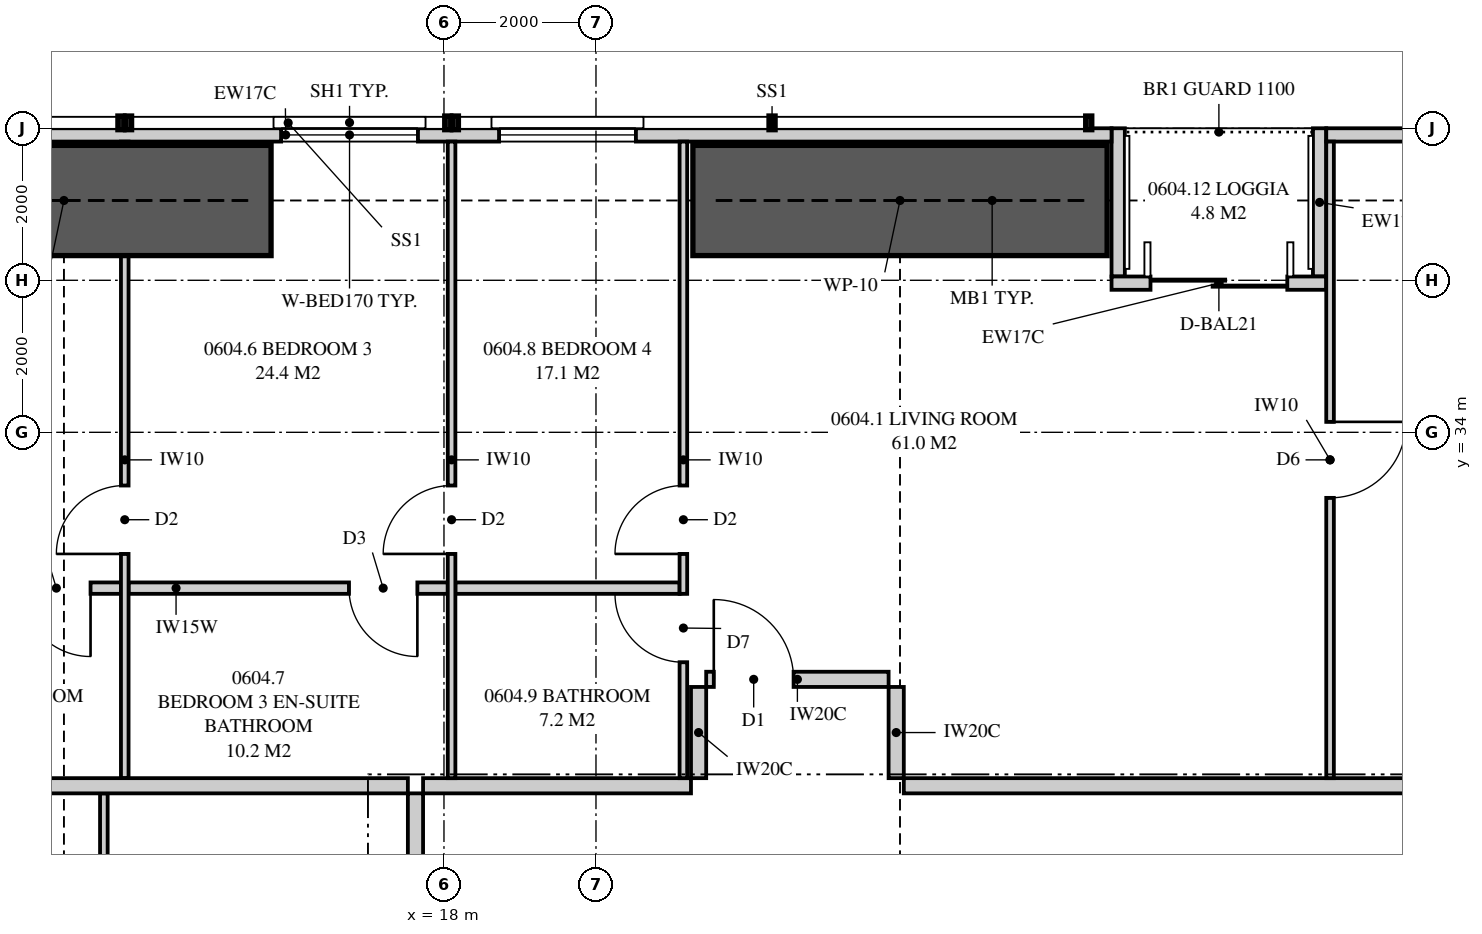
"""IFC4 building model, lengths in metres.
Left out: names, types, materials, properties, quantities, classifications, styles, units other than length and angle.
Written with IfcOpenShell. Run it as: python <this file> out.ifc"""

import sys

from ifc_helpers import new_model, si_unit, direction, frame, frame_2d, origin, place, context, subcontext, project, spatial, polyline, rectangle, outline, extrude, element, fill, save


model = new_model("IFC4")
c1 = context("Model", 3, precision=1e-05, world=origin(), true_north=direction((0.0, 1.0)))
c2 = subcontext(c1, "Body", "Model", "MODEL_VIEW")
j1 = project(units=[si_unit("LENGTHUNIT", "METRE"), si_unit("PLANEANGLEUNIT", "RADIAN")], contexts=[c1])
p1 = place(None, origin())
s1 = spatial("IfcSite", under=j1, at=p1, CompositionType="ELEMENT")
p2 = place(p1, origin())
s2 = spatial("IfcBuilding", under=s1, at=p2, CompositionType="ELEMENT")
p3 = place(p2, frame((0.0, 0.0, 27.7)))
s3 = spatial("IfcBuildingStorey", under=s2, at=p3, CompositionType="ELEMENT", Elevation=27.7)
p4 = place(p3, frame((38.174, 37.913, 0.0), z_axis=(0.0, 0.0, 1.0), x_axis=(-1.0, 0.0, 0.0)))
e1 = element("IfcWall", 1, at=p4, inside=s3, PredefinedType="SOLIDWALL", context=c2, shape_type="SweptSolid", body=[
    extrude(outline(polyline([(0.0, 0.0), (8.565, 0.0), (8.565, 2.15), (3.174, 2.15), (3.174, 3.11), (3.018, 3.11), (3.018, 2.15), (2.97, 2.15), (2.97, 3.11), (0.0, 3.11), (0.0, 0.0)])), frame((0.0, 0.087, 0.0), z_axis=(0.0, -1.0, 0.0), x_axis=(1.0, 0.0, 0.0)), (0.0, 0.0, 1.0), 0.175),
])
p5 = place(p4, frame((6.092, 0.0, 0.4)))
e2 = element("IfcOpeningElement", 2, at=p5, cuts=e1, PredefinedType="OPENING", context=c2, shape_type="SweptSolid", body=[
    extrude(rectangle(XDim=1.2, YDim=1.7, at=frame_2d((0.6, 0.85))), frame((0.0, 0.097, 0.0), z_axis=(0.0, -1.0, 0.0), x_axis=(1.0, 0.0, 0.0)), (0.0, 0.0, 1.0), 0.195),
])
p6 = place(p3, frame((26.783, 37.913, 0.0), z_axis=(0.0, 0.0, 1.0), x_axis=(-1.0, 0.0, 0.0)))
e3 = element("IfcWall", 3, at=p6, inside=s3, PredefinedType="SOLIDWALL", context=c2, shape_type="SweptSolid", body=[
    extrude(outline(polyline([(0.0, 0.0), (21.732, 0.0), (21.732, 3.11), (13.987, 3.11), (13.987, 2.15), (13.939, 2.15), (13.939, 3.11), (13.783, 3.11), (13.783, 2.15), (0.0, 2.15), (0.0, 0.0)])), frame((0.0, 0.087, 0.0), z_axis=(0.0, -1.0, 0.0), x_axis=(1.0, 0.0, 0.0)), (0.0, 0.0, 1.0), 0.175),
])
p7 = place(p6, frame((6.258, 0.0, 0.4)))
e4 = element("IfcOpeningElement", 4, at=p7, cuts=e3, PredefinedType="OPENING", context=c2, shape_type="SweptSolid", body=[
    extrude(rectangle(XDim=1.8, YDim=1.7, at=frame_2d((0.9, 0.85))), frame((0.0, 0.097, 0.0), z_axis=(0.0, -1.0, 0.0), x_axis=(1.0, 0.0, 0.0)), (0.0, 0.0, 1.0), 0.195),
])
p8 = place(p6, frame((9.126, 0.0, 0.4)))
e5 = element("IfcOpeningElement", 5, at=p8, cuts=e3, PredefinedType="OPENING", context=c2, shape_type="SweptSolid", body=[
    extrude(rectangle(XDim=1.8, YDim=1.7, at=frame_2d((0.9, 0.85))), frame((0.0, 0.097, 0.0), z_axis=(0.0, -1.0, 0.0), x_axis=(1.0, 0.0, 0.0)), (0.0, 0.0, 1.0), 0.195),
])
p9 = place(p6, frame((16.613, 0.0, 0.4)))
e6 = element("IfcOpeningElement", 6, at=p9, cuts=e3, PredefinedType="OPENING", context=c2, shape_type="SweptSolid", body=[
    extrude(rectangle(XDim=1.8, YDim=1.7, at=frame_2d((0.9, 0.85))), frame((0.0, 0.097, 0.0), z_axis=(0.0, -1.0, 0.0), x_axis=(1.0, 0.0, 0.0)), (0.0, 0.0, 1.0), 0.195),
])
p10 = place(p3, frame((29.608, 35.962, 0.0), z_axis=(0.0, 0.0, 1.0), x_axis=(-1.0, 0.0, 0.0)))
e7 = element("IfcWall", 7, at=p10, inside=s3, PredefinedType="SOLIDWALL", context=c2, shape_type="SweptSolid", body=[
    extrude(rectangle(XDim=2.825, YDim=0.175, at=frame_2d((1.413, 0.0))), origin(), (0.0, 0.0, 1.0), 3.11),
])
p11 = place(p10, frame((0.512, 0.0, 0.0)))
e8 = element("IfcOpeningElement", 8, at=p11, cuts=e7, PredefinedType="OPENING", context=c2, shape_type="SweptSolid", body=[
    extrude(rectangle(XDim=1.8, YDim=2.1, at=frame_2d((0.9, 1.05))), frame((0.0, 0.097, 0.0), z_axis=(0.0, -1.0, 0.0), x_axis=(1.0, 0.0, 0.0)), (0.0, 0.0, 1.0), 0.195),
])
for number, where, z_axis, x_axis in (
    (9, (29.521, 38.0, 0.0), (0.0, 0.0, 1.0), (0.0, -1.0, 0.0)),
    (10, (26.871, 38.0, 0.0), (0.0, 0.0, 1.0), (0.0, -1.0, 0.0)),
):
    element("IfcWall", number, at=place(p3, frame(where, z_axis=z_axis, x_axis=x_axis)), inside=s3, PredefinedType="SOLIDWALL", context=c2, shape_type="SweptSolid", body=[
        extrude(outline(polyline([(0.0, 0.0), (1.95, 0.0), (1.95, 3.11), (1.75, 3.11), (1.75, 2.15), (0.15, 2.15), (0.15, 3.11), (0.0, 3.11), (0.0, 0.0)])), frame((0.0, 0.087, 0.0), z_axis=(0.0, -1.0, 0.0), x_axis=(1.0, 0.0, 0.0)), (0.0, 0.0, 1.0), 0.175),
    ])
p12 = place(p3, frame((17.725, 29.35, 0.0), z_axis=(0.0, 0.0, 1.0), x_axis=(1.0, 0.0, 0.0)))
e11 = element("IfcWall", 11, at=p12, inside=s3, PredefinedType="PARTITIONING", context=c2, shape_type="SweptSolid", body=[
    extrude(rectangle(XDim=3.525, YDim=0.2, at=frame_2d((1.762, 0.0))), origin(), (0.0, 0.0, 1.0), 3.11),
])
p13 = place(p3, frame((13.8, 37.825, 0.0), z_axis=(0.0, 0.0, 1.0), x_axis=(0.0, -1.0, 0.0)))
e12 = element("IfcWall", 12, at=p13, inside=s3, PredefinedType="PARTITIONING", context=c2, shape_type="SweptSolid", body=[
    extrude(outline(polyline([(1.635, 2.15), (0.0, 2.15), (0.0, 0.0), (8.375, 0.0), (8.375, 3.11), (1.635, 3.11), (1.635, 2.15)]), holes=[polyline([(1.021, 0.126), (0.529, 0.126), (0.529, 0.919), (1.021, 0.919), (1.021, 0.126)]), polyline([(1.021, 1.231), (0.529, 1.231), (0.529, 2.024), (1.021, 2.024), (1.021, 1.231)])]), frame((0.0, 0.05, 0.0), z_axis=(0.0, -1.0, 0.0), x_axis=(1.0, 0.0, 0.0)), (0.0, 0.0, 1.0), 0.1),
])
p14 = place(p13, frame((4.525, 0.0, 0.0)))
e13 = element("IfcOpeningElement", 13, at=p14, cuts=e12, PredefinedType="OPENING", context=c2, shape_type="SweptSolid", body=[
    extrude(rectangle(XDim=0.9, YDim=2.1, at=frame_2d((0.45, 1.05))), frame((0.0, 0.06, 0.0), z_axis=(0.0, -1.0, 0.0), x_axis=(1.0, 0.0, 0.0)), (0.0, 0.0, 1.0), 0.12),
])
p15 = place(p3, frame((18.1, 37.825, 0.0), z_axis=(0.0, 0.0, 1.0), x_axis=(0.0, -1.0, 0.0)))
e14 = element("IfcWall", 14, at=p15, inside=s3, PredefinedType="PARTITIONING", context=c2, shape_type="SweptSolid", body=[
    extrude(outline(polyline([(0.0, 0.0), (8.375, 0.0), (8.375, 3.11), (1.635, 3.11), (1.635, 2.15), (0.0, 2.15), (0.0, 3.11), (0.0, 0.0)])), frame((0.0, 0.05, 0.0), z_axis=(0.0, -1.0, 0.0), x_axis=(1.0, 0.0, 0.0)), (0.0, 0.0, 1.0), 0.1),
])
p16 = place(p15, frame((4.525, 0.0, 0.0)))
e15 = element("IfcOpeningElement", 15, at=p16, cuts=e14, PredefinedType="OPENING", context=c2, shape_type="SweptSolid", body=[
    extrude(rectangle(XDim=0.9, YDim=2.1, at=frame_2d((0.45, 1.05))), frame((0.0, 0.06, 0.0), z_axis=(0.0, -1.0, 0.0), x_axis=(1.0, 0.0, 0.0)), (0.0, 0.0, 1.0), 0.12),
])
p17 = place(p3, frame((21.15, 37.825, 0.0), z_axis=(0.0, 0.0, 1.0), x_axis=(0.0, -1.0, 0.0)))
e16 = element("IfcWall", 16, at=p17, inside=s3, PredefinedType="PARTITIONING", context=c2, shape_type="SweptSolid", body=[
    extrude(outline(polyline([(0.0, 0.0), (8.375, 0.0), (8.375, 3.11), (1.635, 3.11), (1.635, 2.15), (0.0, 2.15), (0.0, 3.11), (0.0, 0.0)])), frame((0.0, 0.05, 0.0), z_axis=(0.0, -1.0, 0.0), x_axis=(1.0, 0.0, 0.0)), (0.0, 0.0, 1.0), 0.1),
])
p18 = place(p17, frame((4.525, 0.0, 0.0)))
e17 = element("IfcOpeningElement", 17, at=p18, cuts=e16, PredefinedType="OPENING", context=c2, shape_type="SweptSolid", body=[
    extrude(rectangle(XDim=0.9, YDim=2.1, at=frame_2d((0.45, 1.05))), frame((0.0, 0.06, 0.0), z_axis=(0.0, -1.0, 0.0), x_axis=(1.0, 0.0, 0.0)), (0.0, 0.0, 1.0), 0.12),
])
p19 = place(p17, frame((5.95, 0.0, 0.0)))
e18 = element("IfcOpeningElement", 18, at=p19, cuts=e16, PredefinedType="OPENING", context=c2, shape_type="SweptSolid", body=[
    extrude(rectangle(XDim=0.9, YDim=2.1, at=frame_2d((0.45, 1.05))), frame((0.0, 0.06, 0.0), z_axis=(0.0, -1.0, 0.0), x_axis=(1.0, 0.0, 0.0)), (0.0, 0.0, 1.0), 0.12),
])
p20 = place(p3, frame((7.85, 31.95, 0.0), z_axis=(0.0, 0.0, 1.0), x_axis=(1.0, 0.0, 0.0)))
e19 = element("IfcWall", 19, at=p20, inside=s3, PredefinedType="PLUMBINGWALL", context=c2, shape_type="SweptSolid", body=[
    extrude(outline(polyline([(0.0, 0.0), (5.9, 0.0), (5.9, 3.11), (5.462, 3.11), (5.462, 2.541), (4.838, 2.541), (4.838, 3.11), (3.635, 3.11), (3.635, 2.51), (1.065, 2.51), (1.065, 3.11), (0.0, 3.11), (0.0, 0.0)])), frame((0.0, 0.075, 0.0), z_axis=(0.0, -1.0, 0.0), x_axis=(1.0, 0.0, 0.0)), (0.0, 0.0, 1.0), 0.15),
])
p21 = place(p20, frame((4.6, 0.0, 0.0)))
e20 = element("IfcOpeningElement", 20, at=p21, cuts=e19, PredefinedType="OPENING", context=c2, shape_type="SweptSolid", body=[
    extrude(rectangle(XDim=0.9, YDim=2.1, at=frame_2d((0.45, 1.05))), frame((0.0, 0.085, 0.0), z_axis=(0.0, -1.0, 0.0), x_axis=(1.0, 0.0, 0.0)), (0.0, 0.0, 1.0), 0.17),
])
p22 = place(p3, frame((13.85, 31.95, 0.0), z_axis=(0.0, 0.0, 1.0), x_axis=(1.0, 0.0, 0.0)))
e21 = element("IfcWall", 21, at=p22, inside=s3, PredefinedType="PLUMBINGWALL", context=c2, shape_type="SweptSolid", body=[
    extrude(rectangle(XDim=4.2, YDim=0.15, at=frame_2d((2.1, 0.0))), origin(), (0.0, 0.0, 1.0), 3.11),
])
p23 = place(p22, frame((2.9, 0.0, 0.0)))
e22 = element("IfcOpeningElement", 22, at=p23, cuts=e21, PredefinedType="OPENING", context=c2, shape_type="SweptSolid", body=[
    extrude(rectangle(XDim=0.9, YDim=2.1, at=frame_2d((0.45, 1.05))), frame((0.0, 0.085, 0.0), z_axis=(0.0, -1.0, 0.0), x_axis=(1.0, 0.0, 0.0)), (0.0, 0.0, 1.0), 0.17),
])
p24 = place(p3, frame((18.15, 31.95, 0.0), z_axis=(0.0, 0.0, 1.0), x_axis=(1.0, 0.0, 0.0)))
e23 = element("IfcWall", 23, at=p24, inside=s3, PredefinedType="PLUMBINGWALL", context=c2, shape_type="SweptSolid", body=[
    extrude(rectangle(XDim=2.95, YDim=0.15, at=frame_2d((1.475, 0.0))), origin(), (0.0, 0.0, 1.0), 3.11),
])
p25 = place(p3, frame((29.658, 37.825, 0.0), z_axis=(0.0, 0.0, 1.0), x_axis=(0.0, -1.0, 0.0)))
e24 = element("IfcWall", 24, at=p25, inside=s3, PredefinedType="PARTITIONING", context=c2, shape_type="SweptSolid", body=[
    extrude(outline(polyline([(0.0, 0.0), (8.375, 0.0), (8.375, 3.11), (1.635, 3.11), (1.635, 2.15), (0.0, 2.15), (0.0, 3.11), (0.0, 0.0)])), frame((0.0, 0.05, 0.0), z_axis=(0.0, -1.0, 0.0), x_axis=(1.0, 0.0, 0.0)), (0.0, 0.0, 1.0), 0.1),
])
p26 = place(p25, frame((3.688, 0.0, 0.0)))
e25 = element("IfcOpeningElement", 25, at=p26, cuts=e24, PredefinedType="OPENING", context=c2, shape_type="SweptSolid", body=[
    extrude(rectangle(XDim=1.0, YDim=2.1, at=frame_2d((0.5, 1.05))), frame((0.0, 0.06, 0.0), z_axis=(0.0, -1.0, 0.0), x_axis=(1.0, 0.0, 0.0)), (0.0, 0.0, 1.0), 0.12),
])
p27 = place(p3, frame((2.0, 29.35, 0.0), z_axis=(0.0, 0.0, 1.0), x_axis=(1.0, 0.0, 0.0)))
e26 = element("IfcWall", 26, at=p27, inside=s3, PredefinedType="PARTITIONING", context=c2, shape_type="SweptSolid", body=[
    extrude(outline(polyline([(0.0, 0.0), (15.525, 0.0), (15.525, 3.11), (11.337, 3.11), (11.337, 2.541), (10.663, 2.541), (10.663, 3.11), (9.51, 3.11), (9.51, 2.51), (6.89, 2.51), (6.89, 3.11), (2.969, 3.11), (2.969, 2.541), (2.577, 2.541), (2.577, 2.15), (0.733, 2.15), (0.733, 3.11), (0.0, 3.11), (0.0, 0.0)])), frame((0.0, 0.1, 0.0), z_axis=(0.0, -1.0, 0.0), x_axis=(1.0, 0.0, 0.0)), (0.0, 0.0, 1.0), 0.2),
])
p28 = place(p3, frame((13.525, 11.3, 0.0), z_axis=(0.0, 0.0, 1.0), x_axis=(0.0, 1.0, 0.0)))
e27 = element("IfcWall", 27, at=p28, inside=s3, PredefinedType="PARTITIONING", context=c2, shape_type="SweptSolid", body=[
    extrude(outline(polyline([(0.0, 0.0), (17.95, 0.0), (17.95, 3.11), (13.987, 3.11), (13.987, 2.541), (13.413, 2.541), (13.413, 3.11), (1.987, 3.11), (1.987, 2.541), (1.413, 2.541), (1.413, 3.11), (0.0, 3.11), (0.0, 0.0)])), frame((0.0, 0.05, 0.0), z_axis=(0.0, -1.0, 0.0), x_axis=(1.0, 0.0, 0.0)), (0.0, 0.0, 1.0), 0.1),
])
p29 = place(p28, frame((6.7, 0.0, 0.0)))
e28 = element("IfcOpeningElement", 28, at=p29, cuts=e27, PredefinedType="OPENING", context=c2, shape_type="SweptSolid", body=[
    extrude(rectangle(XDim=1.0, YDim=2.1, at=frame_2d((0.5, 1.05))), frame((0.0, 0.06, 0.0), z_axis=(0.0, -1.0, 0.0), x_axis=(1.0, 0.0, 0.0)), (0.0, 0.0, 1.0), 0.12),
])
p30 = place(p3, frame((24.05, 29.35, 0.0), z_axis=(0.0, 0.0, 1.0), x_axis=(1.0, 0.0, 0.0)))
e29 = element("IfcWall", 29, at=p30, inside=s3, PredefinedType="PARTITIONING", context=c2, shape_type="SweptSolid", body=[
    extrude(outline(polyline([(0.0, 0.0), (13.05, 0.0), (13.05, 3.11), (11.287, 3.11), (11.287, 2.541), (10.613, 2.541), (10.613, 3.11), (0.287, 3.11), (0.287, 2.541), (0.0, 2.541), (0.0, 3.11), (0.0, 0.0)])), frame((0.0, 0.1, 0.0), z_axis=(0.0, -1.0, 0.0), x_axis=(1.0, 0.0, 0.0)), (0.0, 0.0, 1.0), 0.2),
])
p31 = place(p3, frame((21.45, 30.75, 0.0), z_axis=(0.0, 0.0, 1.0), x_axis=(1.0, 0.0, 0.0)))
e30 = element("IfcWall", 30, at=p31, inside=s3, PredefinedType="PARTITIONING", context=c2, shape_type="SweptSolid", body=[
    extrude(outline(polyline([(0.0, 0.0), (2.4, 0.0), (2.4, 3.11), (2.4, 2.541), (2.213, 2.541), (2.213, 3.11), (0.0, 3.11), (0.0, 0.0)])), frame((0.0, 0.1, 0.0), z_axis=(0.0, -1.0, 0.0), x_axis=(1.0, 0.0, 0.0)), (0.0, 0.0, 1.0), 0.2),
])
p32 = place(p31, frame((0.1, 0.0, 0.0)))
e31 = element("IfcOpeningElement", 31, at=p32, cuts=e30, PredefinedType="OPENING", context=c2, shape_type="SweptSolid", body=[
    extrude(rectangle(XDim=1.05, YDim=2.2, at=frame_2d((0.525, 1.1))), frame((0.0, 0.11, 0.0), z_axis=(0.0, -1.0, 0.0), x_axis=(1.0, 0.0, 0.0)), (0.0, 0.0, 1.0), 0.22),
])
p33 = place(p3, frame((21.35, 29.45, 0.0), z_axis=(0.0, 0.0, 1.0), x_axis=(0.0, 1.0, 0.0)))
e32 = element("IfcWall", 32, at=p33, inside=s3, PredefinedType="PARTITIONING", context=c2, shape_type="SweptSolid", body=[
    extrude(rectangle(XDim=1.2, YDim=0.2, at=frame_2d((0.6, 0.0))), origin(), (0.0, 0.0, 1.0), 3.11),
])
p34 = place(p3, frame((23.95, 29.45, 0.0), z_axis=(0.0, 0.0, 1.0), x_axis=(0.0, 1.0, 0.0)))
e33 = element("IfcWall", 33, at=p34, inside=s3, PredefinedType="PARTITIONING", context=c2, shape_type="SweptSolid", body=[
    extrude(outline(polyline([(0.0, 0.0), (1.2, 0.0), (1.2, 3.11), (1.2, 2.541), (0.0, 2.541), (0.0, 3.11), (0.0, 0.0)])), frame((0.0, 0.1, 0.0), z_axis=(0.0, -1.0, 0.0), x_axis=(1.0, 0.0, 0.0)), (0.0, 0.0, 1.0), 0.2),
])
p35 = place(p3, frame((17.625, 19.9, 0.0), z_axis=(0.0, 0.0, 1.0), x_axis=(0.0, 1.0, 0.0)))
e34 = element("IfcWall", 34, at=p35, inside=s3, PredefinedType="PARTITIONING", context=c2, shape_type="SweptSolid", body=[
    extrude(outline(polyline([(0.0, 0.0), (9.35, 0.0), (9.35, 3.11), (5.437, 3.11), (5.437, 2.541), (4.763, 2.541), (4.763, 3.11), (0.0, 3.11), (0.0, 0.0)])), frame((0.0, 0.1, 0.0), z_axis=(0.0, -1.0, 0.0), x_axis=(1.0, 0.0, 0.0)), (0.0, 0.0, 1.0), 0.2),
])
for number, where, z_axis, x_axis in (
    (35, (21.275, 37.05, 0.0), (0.0, 0.0, 1.0), (1.0, 0.0, 0.0)),
    (36, (10.275, 37.05, 0.0), (0.0, 0.0, 1.0), (1.0, 0.0, 0.0)),
):
    element("IfcWall", number, at=place(p3, frame(where, z_axis=z_axis, x_axis=x_axis)), inside=s3, PredefinedType="SHEAR", context=c2, shape_type="SweptSolid", body=[
        extrude(rectangle(XDim=5.45, YDim=1.45, at=frame_2d((2.725, 0.0))), origin(), (0.0, 0.0, 1.0), 3.35),
    ])
p36 = place(p11, origin())
e37 = element("IfcDoor", 37, at=p36, inside=s3, OperationType="SLIDING_TO_LEFT", PredefinedType="DOOR", context=c2, shape_type="SweptSolid", body=[
    extrude(rectangle(XDim=1.8, YDim=2.1, at=frame_2d((0.9, 1.05))), frame((0.0, 0.025, 0.0), z_axis=(0.0, -1.0, 0.0), x_axis=(1.0, 0.0, 0.0)), (0.0, 0.0, 1.0), 0.05),
])
fill(e8, e37)
p37 = place(p7, origin())
e38 = element("IfcWindow", 38, at=p37, inside=s3, PartitioningType="SINGLE_PANEL", PredefinedType="WINDOW", context=c2, shape_type="SweptSolid", body=[
    extrude(rectangle(XDim=1.8, YDim=1.7, at=frame_2d((0.9, 0.85))), frame((0.0, 0.03, 0.0), z_axis=(0.0, -1.0, 0.0), x_axis=(1.0, 0.0, 0.0)), (0.0, 0.0, 1.0), 0.06),
])
fill(e4, e38)
p38 = place(p8, origin())
e39 = element("IfcWindow", 39, at=p38, inside=s3, PartitioningType="SINGLE_PANEL", PredefinedType="WINDOW", context=c2, shape_type="SweptSolid", body=[
    extrude(rectangle(XDim=1.8, YDim=1.7, at=frame_2d((0.9, 0.85))), frame((0.0, 0.03, 0.0), z_axis=(0.0, -1.0, 0.0), x_axis=(1.0, 0.0, 0.0)), (0.0, 0.0, 1.0), 0.06),
])
fill(e5, e39)
p39 = place(p32, origin())
e40 = element("IfcDoor", 40, at=p39, inside=s3, OperationType="SINGLE_SWING_LEFT", PredefinedType="DOOR", context=c2, shape_type="SweptSolid", body=[
    extrude(rectangle(XDim=1.05, YDim=2.2, at=frame_2d((0.525, 1.1))), frame((0.0, 0.025, 0.0), z_axis=(0.0, -1.0, 0.0), x_axis=(1.0, 0.0, 0.0)), (0.0, 0.0, 1.0), 0.05),
])
fill(e31, e40)
p40 = place(p14, frame((0.9, 0.0, 0.0), z_axis=(0.0, 0.0, 1.0), x_axis=(-1.0, 0.0, 0.0)))
e41 = element("IfcDoor", 41, at=p40, inside=s3, OperationType="SINGLE_SWING_LEFT", PredefinedType="DOOR", context=c2, shape_type="SweptSolid", body=[
    extrude(rectangle(XDim=0.9, YDim=2.1, at=frame_2d((0.45, 1.05))), frame((0.0, 0.025, 0.0), z_axis=(0.0, -1.0, 0.0), x_axis=(1.0, 0.0, 0.0)), (0.0, 0.0, 1.0), 0.05),
])
fill(e13, e41)
p41 = place(p21, frame((0.9, 0.0, 0.0), z_axis=(0.0, 0.0, 1.0), x_axis=(-1.0, 0.0, 0.0)))
e42 = element("IfcDoor", 42, at=p41, inside=s3, OperationType="SINGLE_SWING_LEFT", PredefinedType="DOOR", context=c2, shape_type="SweptSolid", body=[
    extrude(rectangle(XDim=0.9, YDim=2.1, at=frame_2d((0.45, 1.05))), frame((0.0, 0.025, 0.0), z_axis=(0.0, -1.0, 0.0), x_axis=(1.0, 0.0, 0.0)), (0.0, 0.0, 1.0), 0.05),
])
fill(e20, e42)
p42 = place(p16, frame((0.9, 0.0, 0.0), z_axis=(0.0, 0.0, 1.0), x_axis=(-1.0, 0.0, 0.0)))
e43 = element("IfcDoor", 43, at=p42, inside=s3, OperationType="SINGLE_SWING_LEFT", PredefinedType="DOOR", context=c2, shape_type="SweptSolid", body=[
    extrude(rectangle(XDim=0.9, YDim=2.1, at=frame_2d((0.45, 1.05))), frame((0.0, 0.025, 0.0), z_axis=(0.0, -1.0, 0.0), x_axis=(1.0, 0.0, 0.0)), (0.0, 0.0, 1.0), 0.05),
])
fill(e15, e43)
p43 = place(p23, frame((0.9, 0.0, 0.0), z_axis=(0.0, 0.0, 1.0), x_axis=(-1.0, 0.0, 0.0)))
e44 = element("IfcDoor", 44, at=p43, inside=s3, OperationType="SINGLE_SWING_LEFT", PredefinedType="DOOR", context=c2, shape_type="SweptSolid", body=[
    extrude(rectangle(XDim=0.9, YDim=2.1, at=frame_2d((0.45, 1.05))), frame((0.0, 0.025, 0.0), z_axis=(0.0, -1.0, 0.0), x_axis=(1.0, 0.0, 0.0)), (0.0, 0.0, 1.0), 0.05),
])
fill(e22, e44)
p44 = place(p18, frame((0.9, 0.0, 0.0), z_axis=(0.0, 0.0, 1.0), x_axis=(-1.0, 0.0, 0.0)))
e45 = element("IfcDoor", 45, at=p44, inside=s3, OperationType="SINGLE_SWING_LEFT", PredefinedType="DOOR", context=c2, shape_type="SweptSolid", body=[
    extrude(rectangle(XDim=0.9, YDim=2.1, at=frame_2d((0.45, 1.05))), frame((0.0, 0.025, 0.0), z_axis=(0.0, -1.0, 0.0), x_axis=(1.0, 0.0, 0.0)), (0.0, 0.0, 1.0), 0.05),
])
fill(e17, e45)
p45 = place(p19, frame((0.9, 0.0, 0.0), z_axis=(0.0, 0.0, 1.0), x_axis=(-1.0, 0.0, 0.0)))
e46 = element("IfcDoor", 46, at=p45, inside=s3, OperationType="SINGLE_SWING_RIGHT", PredefinedType="DOOR", context=c2, shape_type="SweptSolid", body=[
    extrude(rectangle(XDim=0.9, YDim=2.1, at=frame_2d((0.45, 1.05))), frame((0.0, 0.025, 0.0), z_axis=(0.0, -1.0, 0.0), x_axis=(1.0, 0.0, 0.0)), (0.0, 0.0, 1.0), 0.05),
])
fill(e18, e46)
p46 = place(p26, origin())
e47 = element("IfcDoor", 47, at=p46, inside=s3, OperationType="SINGLE_SWING_LEFT", PredefinedType="DOOR", context=c2, shape_type="SweptSolid", body=[
    extrude(rectangle(XDim=1.0, YDim=2.1, at=frame_2d((0.5, 1.05))), frame((0.0, 0.025, 0.0), z_axis=(0.0, -1.0, 0.0), x_axis=(1.0, 0.0, 0.0)), (0.0, 0.0, 1.0), 0.05),
])
fill(e25, e47)
save(model, sys.argv[1])
